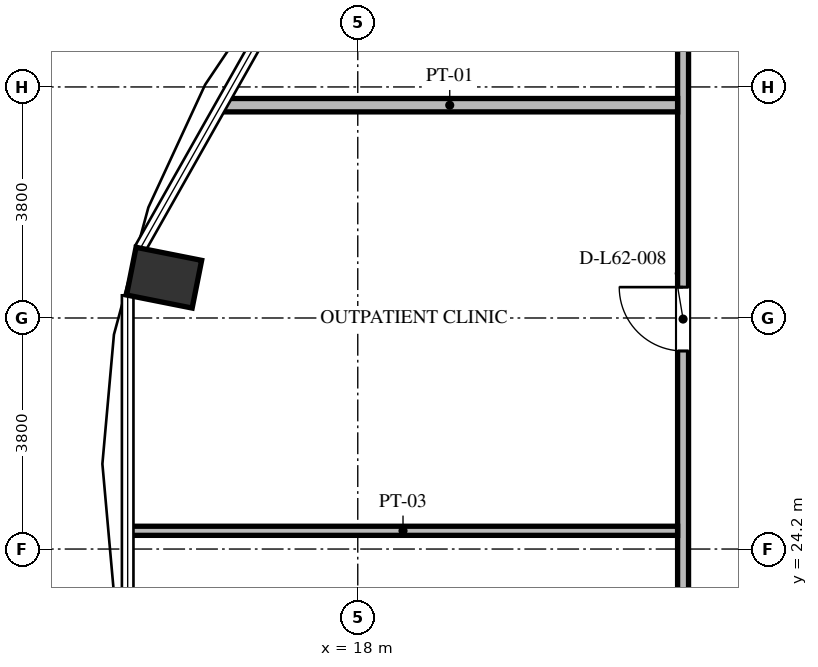
"""IFC4 building model, lengths in metres.
Left out: names, types, materials, properties, quantities, classifications, styles, units other than length and angle.
Written with IfcOpenShell. Run it as: python <this file> out.ifc"""

import sys

from ifc_helpers import new_model, si_unit, direction, frame, frame_2d, origin, origin_2d, place, context, subcontext, project, spatial, rectangle, extrude, element, fill, save


model = new_model("IFC4")
c1 = context("Model", 3, precision=1e-05, world=origin(), true_north=direction((0.0, 1.0)))
c2 = subcontext(c1, "Body", "Model", "MODEL_VIEW")
j1 = project(units=[si_unit("LENGTHUNIT", "METRE"), si_unit("PLANEANGLEUNIT", "RADIAN")], contexts=[c1])
p1 = place(None, origin())
s1 = spatial("IfcSite", under=j1, at=p1, CompositionType="ELEMENT")
p2 = place(p1, origin())
s2 = spatial("IfcBuilding", under=s1, at=p2, CompositionType="ELEMENT")
p3 = place(p2, frame((0.0, 0.0, 238.608)))
s3 = spatial("IfcBuildingStorey", under=s2, at=p3, CompositionType="ELEMENT", Elevation=238.608)
p4 = place(p3, frame((14.815, 28.663, 0.0), z_axis=(0.0, 0.0, 1.0), x_axis=(-0.980785280403, 0.195090322016, 0.0)))
e1 = element("IfcColumn", 1, at=p4, inside=s3, PredefinedType="COLUMN", context=c2, shape_type="SweptSolid", body=[
    extrude(rectangle(XDim=1.1, YDim=0.8, at=origin_2d()), origin(), (0.0, 0.0, 1.0), 3.648),
])
p5 = place(p3, frame((23.35, 19.98, 0.0), z_axis=(0.0, 0.0, 1.0), x_axis=(0.0, 1.0, 0.0)))
e2 = element("IfcWall", 2, at=p5, inside=s3, PredefinedType="PARTITIONING", context=c2, shape_type="SweptSolid", body=[
    extrude(rectangle(XDim=16.042, YDim=0.18, at=frame_2d((8.021, 0.0))), origin(), (0.0, 0.0, 1.0), 3.448),
])
p6 = place(p5, frame((7.478, 0.0, 0.0)))
e3 = element("IfcOpeningElement", 3, at=p6, cuts=e2, PredefinedType="OPENING", context=c2, shape_type="SweptSolid", body=[
    extrude(rectangle(XDim=1.05, YDim=2.15, at=frame_2d((0.525, 1.075))), frame((0.0, 0.1, 0.0), z_axis=(0.0, -1.0, 0.0), x_axis=(1.0, 0.0, 0.0)), (0.0, 0.0, 1.0), 0.2),
])
p7 = place(p5, frame((1.719, 0.0, 0.0)))
e4 = element("IfcOpeningElement", 4, at=p7, cuts=e2, PredefinedType="OPENING", context=c2, shape_type="SweptSolid", body=[
    extrude(rectangle(XDim=1.4, YDim=2.2, at=frame_2d((0.7, 1.1))), frame((0.0, 0.1, 0.0), z_axis=(0.0, -1.0, 0.0), x_axis=(1.0, 0.0, 0.0)), (0.0, 0.0, 1.0), 0.2),
])
p8 = place(p3, frame((14.228, 24.5, 0.0), z_axis=(0.0, 0.0, 1.0), x_axis=(1.0, 0.0, 0.0)))
e5 = element("IfcWall", 5, at=p8, inside=s3, PredefinedType="PARTITIONING", context=c2, shape_type="SweptSolid", body=[
    extrude(rectangle(XDim=9.032, YDim=0.15, at=frame_2d((4.516, 0.0))), origin(), (0.0, 0.0, 1.0), 3.448),
])
p9 = place(p3, frame((15.765, 31.5, 0.0), z_axis=(0.0, 0.0, 1.0), x_axis=(1.0, 0.0, 0.0)))
e6 = element("IfcWall", 6, at=p9, inside=s3, PredefinedType="PARTITIONING", context=c2, shape_type="SweptSolid", body=[
    extrude(rectangle(XDim=7.495, YDim=0.22, at=frame_2d((3.748, 0.0))), origin(), (0.0, 0.0, 1.0), 3.448),
])
p10 = place(p6, origin())
e7 = element("IfcDoor", 7, at=p10, inside=s3, OperationType="SINGLE_SWING_RIGHT", PredefinedType="DOOR", context=c2, shape_type="SweptSolid", body=[
    extrude(rectangle(XDim=1.05, YDim=2.15, at=frame_2d((0.525, 1.075))), frame((0.0, 0.025, 0.0), z_axis=(0.0, -1.0, 0.0), x_axis=(1.0, 0.0, 0.0)), (0.0, 0.0, 1.0), 0.05),
])
fill(e3, e7)
save(model, sys.argv[1])
